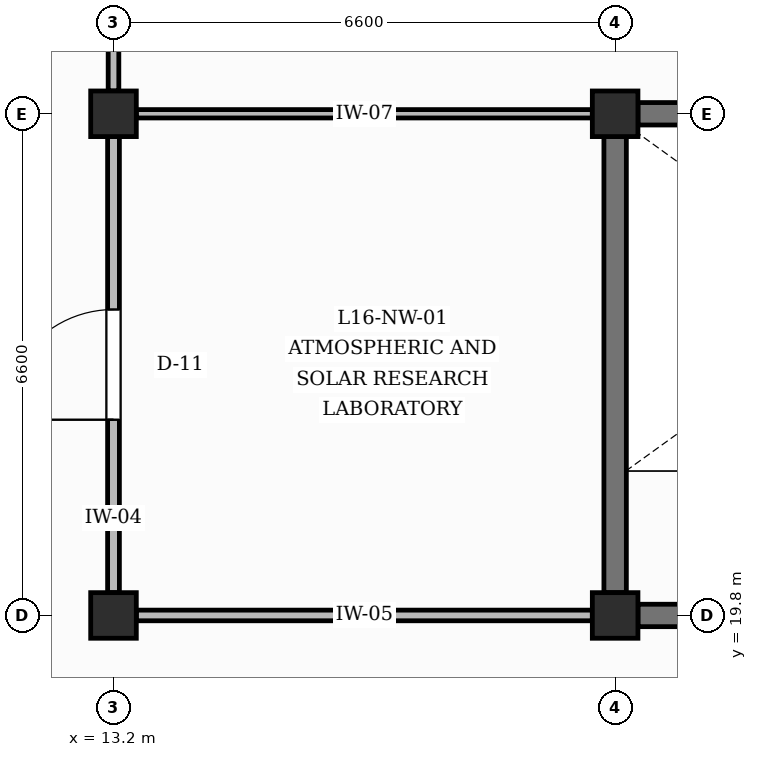
"""IFC4 building model, lengths in metres.
Left out: names, types, materials, properties, quantities, classifications, styles, units other than length and angle.
Written with IfcOpenShell. Run it as: python <this file> out.ifc"""

import sys

from ifc_helpers import new_model, si_unit, direction, frame, frame_2d, origin, origin_2d, place, context, subcontext, project, spatial, rectangle, extrude, element, fill, save


model = new_model("IFC4")
c1 = context("Model", 3, precision=1e-05, world=origin(), true_north=direction((0.0, 1.0)))
c2 = subcontext(c1, "Body", "Model", "MODEL_VIEW")
j1 = project(units=[si_unit("LENGTHUNIT", "METRE"), si_unit("PLANEANGLEUNIT", "RADIAN")], contexts=[c1])
p1 = place(None, origin())
s1 = spatial("IfcSite", under=j1, at=p1, CompositionType="ELEMENT")
p2 = place(p1, origin())
s2 = spatial("IfcBuilding", under=s1, at=p2, CompositionType="ELEMENT")
p3 = place(p2, frame((0.0, 0.0, 69.0)))
s3 = spatial("IfcBuildingStorey", under=s2, at=p3, CompositionType="ELEMENT", Elevation=69.0)
for number, where, z_axis, x_axis in (
    (1, (13.2, 19.8, 0.0), (0.0, 0.0, 1.0), (1.0, 0.0, 0.0)),
    (2, (13.2, 26.4, 0.0), (0.0, 0.0, 1.0), (1.0, 0.0, 0.0)),
    (3, (19.8, 19.8, 0.0), (0.0, 0.0, 1.0), (1.0, 0.0, 0.0)),
    (4, (19.8, 26.4, 0.0), (0.0, 0.0, 1.0), (1.0, 0.0, 0.0)),
):
    element("IfcColumn", number, at=place(p3, frame(where, z_axis=z_axis, x_axis=x_axis)), inside=s3, PredefinedType="COLUMN", context=c2, shape_type="SweptSolid", body=[
        extrude(rectangle(XDim=0.6, YDim=0.6, at=origin_2d()), origin(), (0.0, 0.0, 1.0), 4.2),
    ])
p4 = place(p3, frame((20.1, 19.8, 0.0), z_axis=(0.0, 0.0, 1.0), x_axis=(1.0, 0.0, 0.0)))
e5 = element("IfcWall", 5, at=p4, inside=s3, PredefinedType="SHEAR", context=c2, shape_type="SweptSolid", body=[
    extrude(rectangle(XDim=6.0, YDim=0.295, at=frame_2d((3.0, 0.0))), origin(), (0.0, 0.0, 1.0), 3.56),
])
p5 = place(p4, frame((2.425, 0.0, 0.0)))
e6 = element("IfcOpeningElement", 6, at=p5, cuts=e5, PredefinedType="OPENING", context=c2, shape_type="SweptSolid", body=[
    extrude(rectangle(XDim=1.15, YDim=2.2, at=frame_2d((0.575, 1.1))), frame((0.0, 0.157, 0.0), z_axis=(0.0, -1.0, 0.0), x_axis=(1.0, 0.0, 0.0)), (0.0, 0.0, 1.0), 0.315),
])
p6 = place(p3, frame((20.1, 26.4, 0.0), z_axis=(0.0, 0.0, 1.0), x_axis=(1.0, 0.0, 0.0)))
e7 = element("IfcWall", 7, at=p6, inside=s3, PredefinedType="SHEAR", context=c2, shape_type="SweptSolid", body=[
    extrude(rectangle(XDim=6.0, YDim=0.295, at=frame_2d((3.0, 0.0))), origin(), (0.0, 0.0, 1.0), 3.56),
])
p7 = place(p3, frame((19.8, 20.1, 0.0), z_axis=(0.0, 0.0, 1.0), x_axis=(0.0, 1.0, 0.0)))
e8 = element("IfcWall", 8, at=p7, inside=s3, PredefinedType="SHEAR", context=c2, shape_type="SweptSolid", body=[
    extrude(rectangle(XDim=6.0, YDim=0.295, at=frame_2d((3.0, 0.0))), origin(), (0.0, 0.0, 1.0), 3.62),
])
p8 = place(p3, frame((13.2, 20.1, 0.0), z_axis=(0.0, 0.0, 1.0), x_axis=(0.0, 1.0, 0.0)))
e9 = element("IfcWall", 9, at=p8, inside=s3, PredefinedType="PARTITIONING", context=c2, shape_type="SweptSolid", body=[
    extrude(rectangle(XDim=6.0, YDim=0.155, at=frame_2d((3.0, 0.0))), origin(), (0.0, 0.0, 1.0), 3.62),
])
p9 = place(p8, frame((2.275, 0.0, 0.0)))
e10 = element("IfcOpeningElement", 10, at=p9, cuts=e9, PredefinedType="OPENING", context=c2, shape_type="SweptSolid", body=[
    extrude(rectangle(XDim=1.45, YDim=2.25, at=frame_2d((0.725, 1.125))), frame((0.0, 0.087, 0.0), z_axis=(0.0, -1.0, 0.0), x_axis=(1.0, 0.0, 0.0)), (0.0, 0.0, 1.0), 0.175),
])
p10 = place(p3, frame((13.2, 26.7, 0.0), z_axis=(0.0, 0.0, 1.0), x_axis=(0.0, 1.0, 0.0)))
e11 = element("IfcWall", 11, at=p10, inside=s3, PredefinedType="PARTITIONING", context=c2, shape_type="SweptSolid", body=[
    extrude(rectangle(XDim=6.0, YDim=0.14, at=frame_2d((3.0, 0.0))), origin(), (0.0, 0.0, 1.0), 3.62),
])
p11 = place(p10, frame((2.3, 0.0, 0.0)))
e12 = element("IfcOpeningElement", 12, at=p11, cuts=e11, PredefinedType="OPENING", context=c2, shape_type="SweptSolid", body=[
    extrude(rectangle(XDim=1.4, YDim=2.25, at=frame_2d((0.7, 1.125))), frame((0.0, 0.08, 0.0), z_axis=(0.0, -1.0, 0.0), x_axis=(1.0, 0.0, 0.0)), (0.0, 0.0, 1.0), 0.16),
])
p12 = place(p3, frame((13.5, 19.8, 0.0), z_axis=(0.0, 0.0, 1.0), x_axis=(1.0, 0.0, 0.0)))
e13 = element("IfcWall", 13, at=p12, inside=s3, PredefinedType="PARTITIONING", context=c2, shape_type="SweptSolid", body=[
    extrude(rectangle(XDim=6.0, YDim=0.14, at=frame_2d((3.0, 0.0))), origin(), (0.0, 0.0, 1.0), 3.56),
])
p13 = place(p3, frame((13.5, 26.4, 0.0), z_axis=(0.0, 0.0, 1.0), x_axis=(1.0, 0.0, 0.0)))
e14 = element("IfcWall", 14, at=p13, inside=s3, PredefinedType="PARTITIONING", context=c2, shape_type="SweptSolid", body=[
    extrude(rectangle(XDim=6.0, YDim=0.11, at=frame_2d((3.0, 0.0))), origin(), (0.0, 0.0, 1.0), 3.56),
])
p14 = place(p9, origin())
e15 = element("IfcDoor", 15, at=p14, inside=s3, OperationType="SINGLE_SWING_LEFT", PredefinedType="DOOR", context=c2, shape_type="SweptSolid", body=[
    extrude(rectangle(XDim=1.45, YDim=2.25, at=frame_2d((0.725, 1.125))), frame((0.0, 0.025, 0.0), z_axis=(0.0, -1.0, 0.0), x_axis=(1.0, 0.0, 0.0)), (0.0, 0.0, 1.0), 0.05),
])
fill(e10, e15)
save(model, sys.argv[1])
